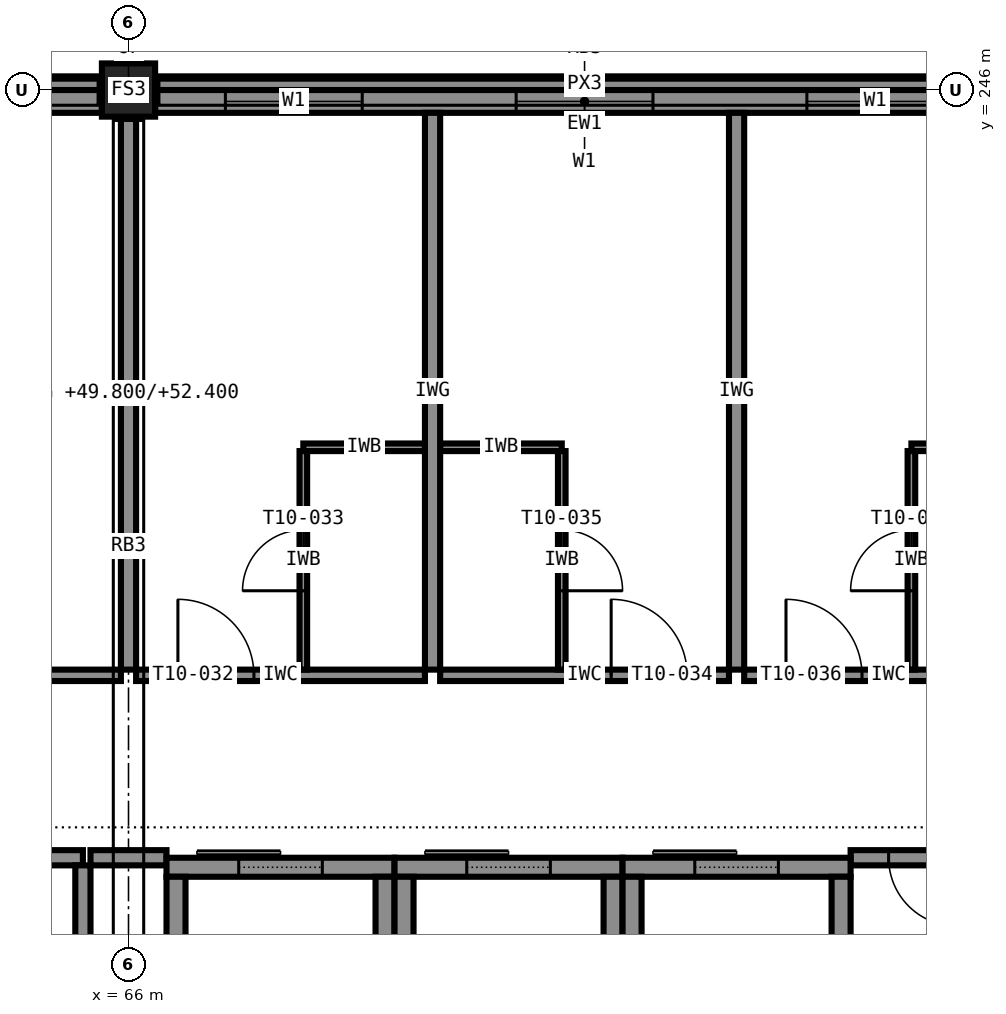
"""IFC4 building model, lengths in metres.
Left out: names, types, materials, properties, quantities, classifications, styles, units other than length and angle.
Written with IfcOpenShell. Run it as: python <this file> out.ifc"""

import sys

from ifc_helpers import new_model, si_unit, direction, frame, frame_2d, origin, origin_2d, place, context, subcontext, project, spatial, rectangle, extrude, element, fill, save


model = new_model("IFC4")
c1 = context("Model", 3, precision=1e-05, world=origin(), true_north=direction((0.0, 1.0)))
c2 = subcontext(c1, "Body", "Model", "MODEL_VIEW")
j1 = project(units=[si_unit("LENGTHUNIT", "METRE"), si_unit("PLANEANGLEUNIT", "RADIAN")], contexts=[c1])
p1 = place(None, origin())
s1 = spatial("IfcSite", under=j1, at=p1, CompositionType="ELEMENT")
p2 = place(p1, origin())
s2 = spatial("IfcBuilding", under=s1, at=p2, CompositionType="ELEMENT")
p3 = place(p2, frame((0.0, 0.0, 49.8)))
s3 = spatial("IfcBuildingStorey", under=s2, at=p3, CompositionType="ELEMENT", Elevation=49.8)
p4 = place(p3, frame((66.0, 246.0, 0.0), z_axis=(0.0, 0.0, 1.0), x_axis=(1.0, 0.0, 0.0)))
e1 = element("IfcColumn", 1, at=p4, inside=s3, PredefinedType="COLUMN", context=c2, shape_type="SweptSolid", body=[
    extrude(rectangle(XDim=0.7, YDim=0.7, at=origin_2d()), origin(), (0.0, 0.0, 1.0), 3.6),
])
p5 = place(p3, frame((66.5, 235.775, 0.0), z_axis=(0.0, 0.0, 1.0), x_axis=(1.0, 0.0, 0.0)))
e2 = element("IfcWall", 2, at=p5, inside=s3, PredefinedType="SHEAR", context=c2, shape_type="SweptSolid", body=[
    extrude(rectangle(XDim=3.0, YDim=0.25, at=frame_2d((1.5, 0.0))), origin(), (0.0, 0.0, 1.0), 3.6),
])
p6 = place(p5, frame((0.95, 0.0, 0.0)))
e3 = element("IfcOpeningElement", 3, at=p6, cuts=e2, PredefinedType="OPENING", context=c2, shape_type="SweptSolid", body=[
    extrude(rectangle(XDim=1.1, YDim=2.1, at=frame_2d((0.55, 1.05))), frame((0.0, 0.135, 0.0), z_axis=(0.0, -1.0, 0.0), x_axis=(1.0, 0.0, 0.0)), (0.0, 0.0, 1.0), 0.27),
])
for number, where, z_axis, x_axis in (
    (4, (66.625, 232.35, 0.0), (0.0, 0.0, 1.0), (0.0, 1.0, 0.0)),
    (5, (69.375, 232.35, 0.0), (0.0, 0.0, 1.0), (0.0, 1.0, 0.0)),
):
    element("IfcWall", number, at=place(p3, frame(where, z_axis=z_axis, x_axis=x_axis)), inside=s3, PredefinedType="SHEAR", context=c2, shape_type="SweptSolid", body=[
        extrude(rectangle(XDim=3.3, YDim=0.25, at=frame_2d((1.65, 0.0))), origin(), (0.0, 0.0, 1.0), 3.6),
    ])
p7 = place(p3, frame((69.5, 235.775, 0.0), z_axis=(0.0, 0.0, 1.0), x_axis=(1.0, 0.0, 0.0)))
e6 = element("IfcWall", 6, at=p7, inside=s3, PredefinedType="SHEAR", context=c2, shape_type="SweptSolid", body=[
    extrude(rectangle(XDim=3.0, YDim=0.25, at=frame_2d((1.5, 0.0))), origin(), (0.0, 0.0, 1.0), 3.6),
])
p8 = place(p7, frame((0.95, 0.0, 0.0)))
e7 = element("IfcOpeningElement", 7, at=p8, cuts=e6, PredefinedType="OPENING", context=c2, shape_type="SweptSolid", body=[
    extrude(rectangle(XDim=1.1, YDim=2.1, at=frame_2d((0.55, 1.05))), frame((0.0, 0.135, 0.0), z_axis=(0.0, -1.0, 0.0), x_axis=(1.0, 0.0, 0.0)), (0.0, 0.0, 1.0), 0.27),
])
for number, where, z_axis, x_axis in (
    (8, (69.625, 232.35, 0.0), (0.0, 0.0, 1.0), (0.0, 1.0, 0.0)),
    (9, (72.375, 232.35, 0.0), (0.0, 0.0, 1.0), (0.0, 1.0, 0.0)),
):
    element("IfcWall", number, at=place(p3, frame(where, z_axis=z_axis, x_axis=x_axis)), inside=s3, PredefinedType="SHEAR", context=c2, shape_type="SweptSolid", body=[
        extrude(rectangle(XDim=3.3, YDim=0.25, at=frame_2d((1.65, 0.0))), origin(), (0.0, 0.0, 1.0), 3.6),
    ])
p9 = place(p3, frame((72.5, 235.775, 0.0), z_axis=(0.0, 0.0, 1.0), x_axis=(1.0, 0.0, 0.0)))
e10 = element("IfcWall", 10, at=p9, inside=s3, PredefinedType="SHEAR", context=c2, shape_type="SweptSolid", body=[
    extrude(rectangle(XDim=3.0, YDim=0.25, at=frame_2d((1.5, 0.0))), origin(), (0.0, 0.0, 1.0), 3.6),
])
p10 = place(p9, frame((0.95, 0.0, 0.0)))
e11 = element("IfcOpeningElement", 11, at=p10, cuts=e10, PredefinedType="OPENING", context=c2, shape_type="SweptSolid", body=[
    extrude(rectangle(XDim=1.1, YDim=2.1, at=frame_2d((0.55, 1.05))), frame((0.0, 0.135, 0.0), z_axis=(0.0, -1.0, 0.0), x_axis=(1.0, 0.0, 0.0)), (0.0, 0.0, 1.0), 0.27),
])
for number, where, z_axis, x_axis in (
    (12, (72.625, 232.35, 0.0), (0.0, 0.0, 1.0), (0.0, 1.0, 0.0)),
    (13, (75.375, 232.35, 0.0), (0.0, 0.0, 1.0), (0.0, 1.0, 0.0)),
):
    element("IfcWall", number, at=place(p3, frame(where, z_axis=z_axis, x_axis=x_axis)), inside=s3, PredefinedType="SHEAR", context=c2, shape_type="SweptSolid", body=[
        extrude(rectangle(XDim=3.3, YDim=0.25, at=frame_2d((1.65, 0.0))), origin(), (0.0, 0.0, 1.0), 3.6),
    ])
p11 = place(p3, frame((77.65, 245.85, 0.0), z_axis=(0.0, 0.0, 1.0), x_axis=(-1.0, 0.0, 0.0)))
e14 = element("IfcWall", 14, at=p11, inside=s3, PredefinedType="STANDARD", context=c2, shape_type="SweptSolid", body=[
    extrude(rectangle(XDim=11.3, YDim=0.3, at=frame_2d((5.65, 0.0))), origin(), (0.0, 0.0, 1.0), 2.6),
])
p12 = place(p11, frame((8.575, 0.0, 0.85)))
e15 = element("IfcOpeningElement", 15, at=p12, cuts=e14, PredefinedType="OPENING", context=c2, shape_type="SweptSolid", body=[
    extrude(rectangle(XDim=1.8, YDim=1.75, at=frame_2d((0.9, 0.875))), frame((0.0, 0.16, 0.0), z_axis=(0.0, -1.0, 0.0), x_axis=(1.0, 0.0, 0.0)), (0.0, 0.0, 1.0), 0.32),
])
p13 = place(p11, frame((4.75, 0.0, 0.85)))
e16 = element("IfcOpeningElement", 16, at=p13, cuts=e14, PredefinedType="OPENING", context=c2, shape_type="SweptSolid", body=[
    extrude(rectangle(XDim=1.8, YDim=1.75, at=frame_2d((0.9, 0.875))), frame((0.0, 0.16, 0.0), z_axis=(0.0, -1.0, 0.0), x_axis=(1.0, 0.0, 0.0)), (0.0, 0.0, 1.0), 0.32),
])
p14 = place(p11, frame((0.925, 0.0, 0.85)))
e17 = element("IfcOpeningElement", 17, at=p14, cuts=e14, PredefinedType="OPENING", context=c2, shape_type="SweptSolid", body=[
    extrude(rectangle(XDim=1.8, YDim=1.75, at=frame_2d((0.9, 0.875))), frame((0.0, 0.16, 0.0), z_axis=(0.0, -1.0, 0.0), x_axis=(1.0, 0.0, 0.0)), (0.0, 0.0, 1.0), 0.32),
])
p15 = place(p3, frame((65.65, 245.85, 0.0), z_axis=(0.0, 0.0, 1.0), x_axis=(-1.0, 0.0, 0.0)))
e18 = element("IfcWall", 18, at=p15, inside=s3, PredefinedType="STANDARD", context=c2, shape_type="SweptSolid", body=[
    extrude(rectangle(XDim=11.3, YDim=0.3, at=frame_2d((5.65, 0.0))), origin(), (0.0, 0.0, 1.0), 2.6),
])
p16 = place(p15, frame((7.575, 0.0, 0.85)))
e19 = element("IfcOpeningElement", 19, at=p16, cuts=e18, PredefinedType="OPENING", context=c2, shape_type="SweptSolid", body=[
    extrude(rectangle(XDim=1.8, YDim=1.75, at=frame_2d((0.9, 0.875))), frame((0.0, 0.16, 0.0), z_axis=(0.0, -1.0, 0.0), x_axis=(1.0, 0.0, 0.0)), (0.0, 0.0, 1.0), 0.32),
])
p17 = place(p15, frame((1.925, 0.0, 0.85)))
e20 = element("IfcOpeningElement", 20, at=p17, cuts=e18, PredefinedType="OPENING", context=c2, shape_type="SweptSolid", body=[
    extrude(rectangle(XDim=1.8, YDim=1.75, at=frame_2d((0.9, 0.875))), frame((0.0, 0.16, 0.0), z_axis=(0.0, -1.0, 0.0), x_axis=(1.0, 0.0, 0.0)), (0.0, 0.0, 1.0), 0.32),
])
for number, where, z_axis, x_axis in (
    (21, (77.65, 246.075, 3.4), (0.0, 0.0, 1.0), (-1.0, 0.0, 0.0)),
    (22, (65.65, 246.075, 3.4), (0.0, 0.0, 1.0), (-1.0, 0.0, 0.0)),
):
    element("IfcWall", number, at=place(p3, frame(where, z_axis=z_axis, x_axis=x_axis)), inside=s3, PredefinedType="STANDARD", context=c2, shape_type="SweptSolid", body=[
        extrude(rectangle(XDim=11.3, YDim=0.15, at=frame_2d((5.65, 0.0))), origin(), (0.0, 0.0, 1.0), 0.2),
    ])
p18 = place(p3, frame((63.5, 235.9, 0.0), z_axis=(0.0, 0.0, 1.0), x_axis=(1.0, 0.0, 0.0)))
e23 = element("IfcWall", 23, at=p18, inside=s3, PredefinedType="PARTITIONING", context=c2, shape_type="SweptSolid", body=[
    extrude(rectangle(XDim=1.9, YDim=0.2, at=frame_2d((0.95, 0.0))), origin(), (0.0, 0.0, 1.0), 3.4),
])
p19 = place(p3, frame((65.5, 235.9, 0.0), z_axis=(0.0, 0.0, 1.0), x_axis=(1.0, 0.0, 0.0)))
e24 = element("IfcWall", 24, at=p19, inside=s3, PredefinedType="PARTITIONING", context=c2, shape_type="SweptSolid", body=[
    extrude(rectangle(XDim=1.0, YDim=0.2, at=frame_2d((0.5, 0.0))), origin(), (0.0, 0.0, 1.0), 3.4),
])
p20 = place(p3, frame((77.4, 235.9, 0.0), z_axis=(0.0, 0.0, 1.0), x_axis=(-1.0, 0.0, 0.0)))
e25 = element("IfcWall", 25, at=p20, inside=s3, PredefinedType="PARTITIONING", context=c2, shape_type="SweptSolid", body=[
    extrude(rectangle(XDim=1.9, YDim=0.2, at=frame_2d((0.95, 0.0))), origin(), (0.0, 0.0, 1.0), 3.4),
])
p21 = place(p20, frame((0.5, 0.0, 0.0)))
e26 = element("IfcOpeningElement", 26, at=p21, cuts=e25, PredefinedType="OPENING", context=c2, shape_type="SweptSolid", body=[
    extrude(rectangle(XDim=0.9, YDim=2.1, at=frame_2d((0.45, 1.05))), frame((0.0, 0.11, 0.0), z_axis=(0.0, -1.0, 0.0), x_axis=(1.0, 0.0, 0.0)), (0.0, 0.0, 1.0), 0.22),
])
p22 = place(p3, frame((65.4, 232.2, 0.0), z_axis=(0.0, 0.0, 1.0), x_axis=(0.0, 1.0, 0.0)))
e27 = element("IfcWall", 27, at=p22, inside=s3, PredefinedType="PARTITIONING", context=c2, shape_type="SweptSolid", body=[
    extrude(rectangle(XDim=3.6, YDim=0.2, at=frame_2d((1.8, 0.0))), origin(), (0.0, 0.0, 1.0), 3.4),
])
p23 = place(p3, frame((60.1, 238.3, 0.0), z_axis=(0.0, 0.0, 1.0), x_axis=(1.0, 0.0, 0.0)))
e28 = element("IfcWall", 28, at=p23, inside=s3, PredefinedType="PARTITIONING", context=c2, shape_type="SweptSolid", body=[
    extrude(rectangle(XDim=5.8, YDim=0.15, at=frame_2d((2.9, 0.0))), origin(), (0.0, 0.0, 1.0), 3.4),
])
p24 = place(p23, frame((3.6, 0.0, 0.0)))
e29 = element("IfcOpeningElement", 29, at=p24, cuts=e28, PredefinedType="OPENING", context=c2, shape_type="SweptSolid", body=[
    extrude(rectangle(XDim=1.0, YDim=2.1, at=frame_2d((0.5, 1.05))), frame((0.0, 0.085, 0.0), z_axis=(0.0, -1.0, 0.0), x_axis=(1.0, 0.0, 0.0)), (0.0, 0.0, 1.0), 0.17),
])
p25 = place(p3, frame((66.1, 238.3, 0.0), z_axis=(0.0, 0.0, 1.0), x_axis=(1.0, 0.0, 0.0)))
e30 = element("IfcWall", 30, at=p25, inside=s3, PredefinedType="PARTITIONING", context=c2, shape_type="SweptSolid", body=[
    extrude(rectangle(XDim=3.8, YDim=0.15, at=frame_2d((1.9, 0.0))), origin(), (0.0, 0.0, 1.0), 3.4),
])
p26 = place(p25, frame((0.55, 0.0, 0.0)))
e31 = element("IfcOpeningElement", 31, at=p26, cuts=e30, PredefinedType="OPENING", context=c2, shape_type="SweptSolid", body=[
    extrude(rectangle(XDim=1.0, YDim=2.1, at=frame_2d((0.5, 1.05))), frame((0.0, 0.085, 0.0), z_axis=(0.0, -1.0, 0.0), x_axis=(1.0, 0.0, 0.0)), (0.0, 0.0, 1.0), 0.17),
])
p27 = place(p3, frame((68.3, 241.3, 0.0), z_axis=(0.0, 0.0, 1.0), x_axis=(1.0, 0.0, 0.0)))
e32 = element("IfcWall", 32, at=p27, inside=s3, PredefinedType="PARTITIONING", context=c2, shape_type="SweptSolid", body=[
    extrude(rectangle(XDim=1.6, YDim=0.1, at=frame_2d((0.8, 0.0))), origin(), (0.0, 0.0, 1.0), 3.4),
])
p28 = place(p3, frame((68.3, 238.375, 0.0), z_axis=(0.0, 0.0, 1.0), x_axis=(0.0, 1.0, 0.0)))
e33 = element("IfcWall", 33, at=p28, inside=s3, PredefinedType="PARTITIONING", context=c2, shape_type="SweptSolid", body=[
    extrude(rectangle(XDim=2.875, YDim=0.1, at=frame_2d((1.438, 0.0))), origin(), (0.0, 0.0, 1.0), 3.4),
])
p29 = place(p28, frame((1.038, 0.0, 0.0)))
e34 = element("IfcOpeningElement", 34, at=p29, cuts=e33, PredefinedType="OPENING", context=c2, shape_type="SweptSolid", body=[
    extrude(rectangle(XDim=0.8, YDim=2.1, at=frame_2d((0.4, 1.05))), frame((0.0, 0.06, 0.0), z_axis=(0.0, -1.0, 0.0), x_axis=(1.0, 0.0, 0.0)), (0.0, 0.0, 1.0), 0.12),
])
p30 = place(p3, frame((70.1, 238.3, 0.0), z_axis=(0.0, 0.0, 1.0), x_axis=(1.0, 0.0, 0.0)))
e35 = element("IfcWall", 35, at=p30, inside=s3, PredefinedType="PARTITIONING", context=c2, shape_type="SweptSolid", body=[
    extrude(rectangle(XDim=3.8, YDim=0.15, at=frame_2d((1.9, 0.0))), origin(), (0.0, 0.0, 1.0), 3.4),
])
p31 = place(p30, frame((2.25, 0.0, 0.0)))
e36 = element("IfcOpeningElement", 36, at=p31, cuts=e35, PredefinedType="OPENING", context=c2, shape_type="SweptSolid", body=[
    extrude(rectangle(XDim=1.0, YDim=2.1, at=frame_2d((0.5, 1.05))), frame((0.0, 0.085, 0.0), z_axis=(0.0, -1.0, 0.0), x_axis=(1.0, 0.0, 0.0)), (0.0, 0.0, 1.0), 0.17),
])
p32 = place(p3, frame((70.1, 241.3, 0.0), z_axis=(0.0, 0.0, 1.0), x_axis=(1.0, 0.0, 0.0)))
e37 = element("IfcWall", 37, at=p32, inside=s3, PredefinedType="PARTITIONING", context=c2, shape_type="SweptSolid", body=[
    extrude(rectangle(XDim=1.6, YDim=0.1, at=frame_2d((0.8, 0.0))), origin(), (0.0, 0.0, 1.0), 3.4),
])
p33 = place(p3, frame((71.7, 241.25, 0.0), z_axis=(0.0, 0.0, 1.0), x_axis=(0.0, -1.0, 0.0)))
e38 = element("IfcWall", 38, at=p33, inside=s3, PredefinedType="PARTITIONING", context=c2, shape_type="SweptSolid", body=[
    extrude(rectangle(XDim=2.875, YDim=0.1, at=frame_2d((1.438, 0.0))), origin(), (0.0, 0.0, 1.0), 3.4),
])
p34 = place(p33, frame((1.038, 0.0, 0.0)))
e39 = element("IfcOpeningElement", 39, at=p34, cuts=e38, PredefinedType="OPENING", context=c2, shape_type="SweptSolid", body=[
    extrude(rectangle(XDim=0.8, YDim=2.1, at=frame_2d((0.4, 1.05))), frame((0.0, 0.06, 0.0), z_axis=(0.0, -1.0, 0.0), x_axis=(1.0, 0.0, 0.0)), (0.0, 0.0, 1.0), 0.12),
])
p35 = place(p3, frame((74.1, 238.3, 0.0), z_axis=(0.0, 0.0, 1.0), x_axis=(1.0, 0.0, 0.0)))
e40 = element("IfcWall", 40, at=p35, inside=s3, PredefinedType="PARTITIONING", context=c2, shape_type="SweptSolid", body=[
    extrude(rectangle(XDim=3.8, YDim=0.15, at=frame_2d((1.9, 0.0))), origin(), (0.0, 0.0, 1.0), 3.4),
])
p36 = place(p35, frame((0.55, 0.0, 0.0)))
e41 = element("IfcOpeningElement", 41, at=p36, cuts=e40, PredefinedType="OPENING", context=c2, shape_type="SweptSolid", body=[
    extrude(rectangle(XDim=1.0, YDim=2.1, at=frame_2d((0.5, 1.05))), frame((0.0, 0.085, 0.0), z_axis=(0.0, -1.0, 0.0), x_axis=(1.0, 0.0, 0.0)), (0.0, 0.0, 1.0), 0.17),
])
p37 = place(p3, frame((76.3, 241.3, 0.0), z_axis=(0.0, 0.0, 1.0), x_axis=(1.0, 0.0, 0.0)))
e42 = element("IfcWall", 42, at=p37, inside=s3, PredefinedType="PARTITIONING", context=c2, shape_type="SweptSolid", body=[
    extrude(rectangle(XDim=1.6, YDim=0.1, at=frame_2d((0.8, 0.0))), origin(), (0.0, 0.0, 1.0), 3.4),
])
p38 = place(p3, frame((76.3, 238.375, 0.0), z_axis=(0.0, 0.0, 1.0), x_axis=(0.0, 1.0, 0.0)))
e43 = element("IfcWall", 43, at=p38, inside=s3, PredefinedType="PARTITIONING", context=c2, shape_type="SweptSolid", body=[
    extrude(rectangle(XDim=2.875, YDim=0.1, at=frame_2d((1.438, 0.0))), origin(), (0.0, 0.0, 1.0), 3.4),
])
p39 = place(p38, frame((1.038, 0.0, 0.0)))
e44 = element("IfcOpeningElement", 44, at=p39, cuts=e43, PredefinedType="OPENING", context=c2, shape_type="SweptSolid", body=[
    extrude(rectangle(XDim=0.8, YDim=2.1, at=frame_2d((0.4, 1.05))), frame((0.0, 0.06, 0.0), z_axis=(0.0, -1.0, 0.0), x_axis=(1.0, 0.0, 0.0)), (0.0, 0.0, 1.0), 0.12),
])
p40 = place(p3, frame((66.0, 245.65, 0.0), z_axis=(0.0, 0.0, 1.0), x_axis=(0.0, -1.0, 0.0)))
e45 = element("IfcWall", 45, at=p40, inside=s3, PredefinedType="PARTITIONING", context=c2, shape_type="SweptSolid", body=[
    extrude(rectangle(XDim=7.275, YDim=0.2, at=frame_2d((3.637, 0.0))), origin(), (0.0, 0.0, 1.0), 2.6),
])
for number, where, z_axis, x_axis in (
    (46, (70.0, 245.7, 0.0), (0.0, 0.0, 1.0), (0.0, -1.0, 0.0)),
    (47, (74.0, 245.7, 0.0), (0.0, 0.0, 1.0), (0.0, -1.0, 0.0)),
):
    element("IfcWall", number, at=place(p3, frame(where, z_axis=z_axis, x_axis=x_axis)), inside=s3, PredefinedType="PARTITIONING", context=c2, shape_type="SweptSolid", body=[
        extrude(rectangle(XDim=7.325, YDim=0.2, at=frame_2d((3.663, 0.0))), origin(), (0.0, 0.0, 1.0), 3.4),
    ])
p41 = place(p12, origin())
e48 = element("IfcWindow", 48, at=p41, inside=s3, PartitioningType="SINGLE_PANEL", PredefinedType="WINDOW", context=c2, shape_type="SweptSolid", body=[
    extrude(rectangle(XDim=1.8, YDim=1.75, at=frame_2d((0.9, 0.875))), frame((0.0, 0.03, 0.0), z_axis=(0.0, -1.0, 0.0), x_axis=(1.0, 0.0, 0.0)), (0.0, 0.0, 1.0), 0.06),
])
fill(e15, e48)
p42 = place(p13, origin())
e49 = element("IfcWindow", 49, at=p42, inside=s3, PartitioningType="SINGLE_PANEL", PredefinedType="WINDOW", context=c2, shape_type="SweptSolid", body=[
    extrude(rectangle(XDim=1.8, YDim=1.75, at=frame_2d((0.9, 0.875))), frame((0.0, 0.03, 0.0), z_axis=(0.0, -1.0, 0.0), x_axis=(1.0, 0.0, 0.0)), (0.0, 0.0, 1.0), 0.06),
])
fill(e16, e49)
p43 = place(p14, origin())
e50 = element("IfcWindow", 50, at=p43, inside=s3, PartitioningType="SINGLE_PANEL", PredefinedType="WINDOW", context=c2, shape_type="SweptSolid", body=[
    extrude(rectangle(XDim=1.8, YDim=1.75, at=frame_2d((0.9, 0.875))), frame((0.0, 0.03, 0.0), z_axis=(0.0, -1.0, 0.0), x_axis=(1.0, 0.0, 0.0)), (0.0, 0.0, 1.0), 0.06),
])
fill(e17, e50)
p44 = place(p21, origin())
e51 = element("IfcDoor", 51, at=p44, inside=s3, OperationType="SINGLE_SWING_LEFT", PredefinedType="DOOR", context=c2, shape_type="SweptSolid", body=[
    extrude(rectangle(XDim=0.9, YDim=2.1, at=frame_2d((0.45, 1.05))), frame((0.0, 0.025, 0.0), z_axis=(0.0, -1.0, 0.0), x_axis=(1.0, 0.0, 0.0)), (0.0, 0.0, 1.0), 0.05),
])
fill(e26, e51)
p45 = place(p26, origin())
e52 = element("IfcDoor", 52, at=p45, inside=s3, OperationType="SINGLE_SWING_LEFT", PredefinedType="DOOR", context=c2, shape_type="SweptSolid", body=[
    extrude(rectangle(XDim=1.0, YDim=2.1, at=frame_2d((0.5, 1.05))), frame((0.0, 0.025, 0.0), z_axis=(0.0, -1.0, 0.0), x_axis=(1.0, 0.0, 0.0)), (0.0, 0.0, 1.0), 0.05),
])
fill(e31, e52)
p46 = place(p29, origin())
e53 = element("IfcDoor", 53, at=p46, inside=s3, OperationType="SINGLE_SWING_LEFT", PredefinedType="DOOR", context=c2, shape_type="SweptSolid", body=[
    extrude(rectangle(XDim=0.8, YDim=2.1, at=frame_2d((0.4, 1.05))), frame((0.0, 0.025, 0.0), z_axis=(0.0, -1.0, 0.0), x_axis=(1.0, 0.0, 0.0)), (0.0, 0.0, 1.0), 0.05),
])
fill(e34, e53)
p47 = place(p31, origin())
e54 = element("IfcDoor", 54, at=p47, inside=s3, OperationType="SINGLE_SWING_LEFT", PredefinedType="DOOR", context=c2, shape_type="SweptSolid", body=[
    extrude(rectangle(XDim=1.0, YDim=2.1, at=frame_2d((0.5, 1.05))), frame((0.0, 0.025, 0.0), z_axis=(0.0, -1.0, 0.0), x_axis=(1.0, 0.0, 0.0)), (0.0, 0.0, 1.0), 0.05),
])
fill(e36, e54)
p48 = place(p34, origin())
e55 = element("IfcDoor", 55, at=p48, inside=s3, OperationType="SINGLE_SWING_RIGHT", PredefinedType="DOOR", context=c2, shape_type="SweptSolid", body=[
    extrude(rectangle(XDim=0.8, YDim=2.1, at=frame_2d((0.4, 1.05))), frame((0.0, 0.025, 0.0), z_axis=(0.0, -1.0, 0.0), x_axis=(1.0, 0.0, 0.0)), (0.0, 0.0, 1.0), 0.05),
])
fill(e39, e55)
p49 = place(p36, origin())
e56 = element("IfcDoor", 56, at=p49, inside=s3, OperationType="SINGLE_SWING_LEFT", PredefinedType="DOOR", context=c2, shape_type="SweptSolid", body=[
    extrude(rectangle(XDim=1.0, YDim=2.1, at=frame_2d((0.5, 1.05))), frame((0.0, 0.025, 0.0), z_axis=(0.0, -1.0, 0.0), x_axis=(1.0, 0.0, 0.0)), (0.0, 0.0, 1.0), 0.05),
])
fill(e41, e56)
p50 = place(p39, origin())
e57 = element("IfcDoor", 57, at=p50, inside=s3, OperationType="SINGLE_SWING_LEFT", PredefinedType="DOOR", context=c2, shape_type="SweptSolid", body=[
    extrude(rectangle(XDim=0.8, YDim=2.1, at=frame_2d((0.4, 1.05))), frame((0.0, 0.025, 0.0), z_axis=(0.0, -1.0, 0.0), x_axis=(1.0, 0.0, 0.0)), (0.0, 0.0, 1.0), 0.05),
])
fill(e44, e57)
p51 = place(p6, origin())
e58 = element("IfcDoor", 58, at=p51, inside=s3, OperationType="SLIDING_TO_LEFT", PredefinedType="DOOR", context=c2, shape_type="SweptSolid", body=[
    extrude(rectangle(XDim=1.1, YDim=2.1, at=frame_2d((0.55, 1.05))), frame((0.0, 0.025, 0.0), z_axis=(0.0, -1.0, 0.0), x_axis=(1.0, 0.0, 0.0)), (0.0, 0.0, 1.0), 0.05),
])
fill(e3, e58)
p52 = place(p8, origin())
e59 = element("IfcDoor", 59, at=p52, inside=s3, OperationType="SLIDING_TO_LEFT", PredefinedType="DOOR", context=c2, shape_type="SweptSolid", body=[
    extrude(rectangle(XDim=1.1, YDim=2.1, at=frame_2d((0.55, 1.05))), frame((0.0, 0.025, 0.0), z_axis=(0.0, -1.0, 0.0), x_axis=(1.0, 0.0, 0.0)), (0.0, 0.0, 1.0), 0.05),
])
fill(e7, e59)
p53 = place(p10, origin())
e60 = element("IfcDoor", 60, at=p53, inside=s3, OperationType="SLIDING_TO_LEFT", PredefinedType="DOOR", context=c2, shape_type="SweptSolid", body=[
    extrude(rectangle(XDim=1.1, YDim=2.1, at=frame_2d((0.55, 1.05))), frame((0.0, 0.025, 0.0), z_axis=(0.0, -1.0, 0.0), x_axis=(1.0, 0.0, 0.0)), (0.0, 0.0, 1.0), 0.05),
])
fill(e11, e60)
save(model, sys.argv[1])
